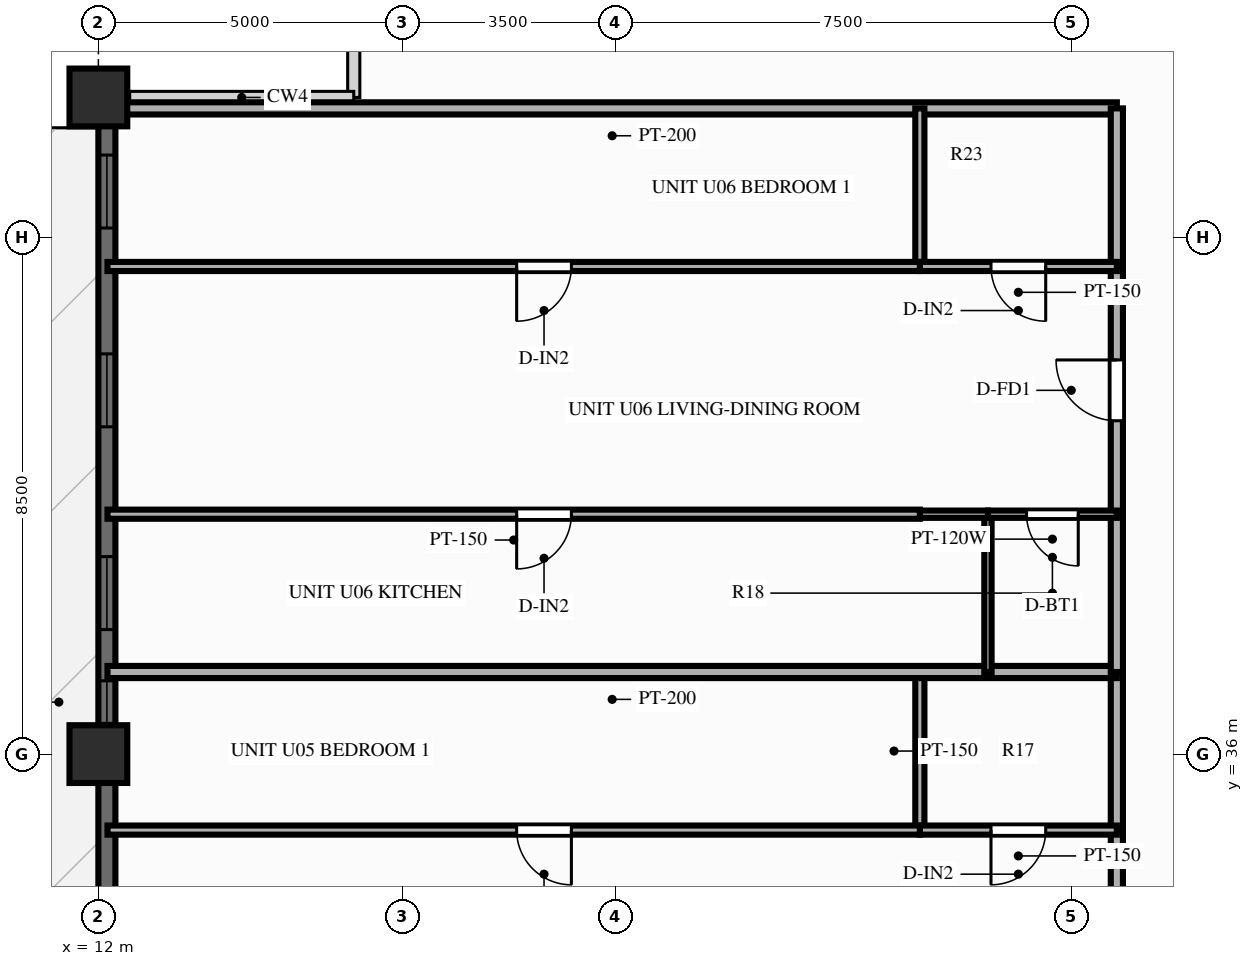
"""IFC4 building model, lengths in metres.
Left out: names, types, materials, properties, quantities, classifications, styles, units other than length and angle.
Written with IfcOpenShell. Run it as: python <this file> out.ifc"""

import sys

from ifc_helpers import new_model, si_unit, direction, frame, frame_2d, origin, origin_2d, place, context, subcontext, project, spatial, rectangle, extrude, source, transform, mapped, element, fill, save


model = new_model("IFC4")
c1 = context("Model", 3, precision=1e-05, world=origin(), true_north=direction((0.0, 1.0)))
c2 = subcontext(c1, "Body", "Model", "MODEL_VIEW")
j1 = project(units=[si_unit("LENGTHUNIT", "METRE"), si_unit("PLANEANGLEUNIT", "RADIAN")], contexts=[c1])
p1 = place(None, origin())
s1 = spatial("IfcSite", under=j1, at=p1, CompositionType="ELEMENT")
p2 = place(p1, origin())
s2 = spatial("IfcBuilding", under=s1, at=p2, CompositionType="ELEMENT")
p3 = place(p2, frame((0.0, 0.0, 126.75)))
s3 = spatial("IfcBuildingStorey", under=s2, at=p3, CompositionType="ELEMENT", Elevation=126.75)
m1 = source(origin(), c2, "Body", "SweptSolid", [
    extrude(rectangle(XDim=0.95, YDim=0.95, at=origin_2d()), origin(), (0.0, 0.0, 1.0), 3.0),
])
for number, where, z_axis, x_axis in (
    (1, (12.0, 46.8, 0.0), (0.0, 0.0, 1.0), (1.0, 0.0, 0.0)),
    (2, (12.0, 36.0, 0.0), (0.0, 0.0, 1.0), (1.0, 0.0, 0.0)),
):
    element("IfcColumn", number, at=place(p3, frame(where, z_axis=z_axis, x_axis=x_axis)), inside=s3, PredefinedType="COLUMN", context=c2, shape_type="MappedRepresentation", body=[
        mapped(m1, transform((0.0, 0.0, 0.0), scale=1.0)),
    ])
p4 = place(p3, frame((12.14, 7.2, 0.0), z_axis=(0.0, 0.0, 1.0), x_axis=(0.0, 1.0, 0.0)))
e3 = element("IfcWall", 3, at=p4, inside=s3, PredefinedType="SOLIDWALL", context=c2, shape_type="SweptSolid", body=[
    extrude(rectangle(XDim=39.6, YDim=0.28, at=frame_2d((19.8, 0.0))), origin(), (0.0, 0.0, 1.0), 2.28),
])
p5 = place(p4, frame((0.949, 0.0, 0.25)))
e4 = element("IfcOpeningElement", 4, at=p5, cuts=e3, PredefinedType="OPENING", context=c2, shape_type="SweptSolid", body=[
    extrude(rectangle(XDim=1.2, YDim=1.5, at=frame_2d((0.6, 0.75))), frame((0.0, 0.152, 0.0), z_axis=(0.0, -1.0, 0.0), x_axis=(1.0, 0.0, 0.0)), (0.0, 0.0, 1.0), 0.304),
])
p6 = place(p4, frame((3.292, 0.0, 0.25)))
e5 = element("IfcOpeningElement", 5, at=p6, cuts=e3, PredefinedType="OPENING", context=c2, shape_type="SweptSolid", body=[
    extrude(rectangle(XDim=1.2, YDim=1.5, at=frame_2d((0.6, 0.75))), frame((0.0, 0.152, 0.0), z_axis=(0.0, -1.0, 0.0), x_axis=(1.0, 0.0, 0.0)), (0.0, 0.0, 1.0), 0.304),
])
p7 = place(p4, frame((5.702, 0.0, 0.25)))
e6 = element("IfcOpeningElement", 6, at=p7, cuts=e3, PredefinedType="OPENING", context=c2, shape_type="SweptSolid", body=[
    extrude(rectangle(XDim=1.2, YDim=1.5, at=frame_2d((0.6, 0.75))), frame((0.0, 0.152, 0.0), z_axis=(0.0, -1.0, 0.0), x_axis=(1.0, 0.0, 0.0)), (0.0, 0.0, 1.0), 0.304),
])
p8 = place(p4, frame((8.112, 0.0, 0.25)))
e7 = element("IfcOpeningElement", 7, at=p8, cuts=e3, PredefinedType="OPENING", context=c2, shape_type="SweptSolid", body=[
    extrude(rectangle(XDim=1.2, YDim=1.5, at=frame_2d((0.6, 0.75))), frame((0.0, 0.152, 0.0), z_axis=(0.0, -1.0, 0.0), x_axis=(1.0, 0.0, 0.0)), (0.0, 0.0, 1.0), 0.304),
])
p9 = place(p4, frame((12.521, 0.0, 0.25)))
e8 = element("IfcOpeningElement", 8, at=p9, cuts=e3, PredefinedType="OPENING", context=c2, shape_type="SweptSolid", body=[
    extrude(rectangle(XDim=1.2, YDim=1.5, at=frame_2d((0.6, 0.75))), frame((0.0, 0.152, 0.0), z_axis=(0.0, -1.0, 0.0), x_axis=(1.0, 0.0, 0.0)), (0.0, 0.0, 1.0), 0.304),
])
p10 = place(p4, frame((14.745, 0.0, 0.25)))
e9 = element("IfcOpeningElement", 9, at=p10, cuts=e3, PredefinedType="OPENING", context=c2, shape_type="SweptSolid", body=[
    extrude(rectangle(XDim=1.2, YDim=1.5, at=frame_2d((0.6, 0.75))), frame((0.0, 0.152, 0.0), z_axis=(0.0, -1.0, 0.0), x_axis=(1.0, 0.0, 0.0)), (0.0, 0.0, 1.0), 0.304),
])
p11 = place(p4, frame((16.97, 0.0, 0.25)))
e10 = element("IfcOpeningElement", 10, at=p11, cuts=e3, PredefinedType="OPENING", context=c2, shape_type="SweptSolid", body=[
    extrude(rectangle(XDim=1.2, YDim=1.5, at=frame_2d((0.6, 0.75))), frame((0.0, 0.152, 0.0), z_axis=(0.0, -1.0, 0.0), x_axis=(1.0, 0.0, 0.0)), (0.0, 0.0, 1.0), 0.304),
])
p12 = place(p4, frame((19.2, 0.0, 0.25)))
e11 = element("IfcOpeningElement", 11, at=p12, cuts=e3, PredefinedType="OPENING", context=c2, shape_type="SweptSolid", body=[
    extrude(rectangle(XDim=1.2, YDim=1.5, at=frame_2d((0.6, 0.75))), frame((0.0, 0.152, 0.0), z_axis=(0.0, -1.0, 0.0), x_axis=(1.0, 0.0, 0.0)), (0.0, 0.0, 1.0), 0.304),
])
p13 = place(p4, frame((21.578, 0.0, 0.25)))
e12 = element("IfcOpeningElement", 12, at=p13, cuts=e3, PredefinedType="OPENING", context=c2, shape_type="SweptSolid", body=[
    extrude(rectangle(XDim=1.2, YDim=1.5, at=frame_2d((0.6, 0.75))), frame((0.0, 0.152, 0.0), z_axis=(0.0, -1.0, 0.0), x_axis=(1.0, 0.0, 0.0)), (0.0, 0.0, 1.0), 0.304),
])
p14 = place(p4, frame((24.713, 0.0, 0.0)))
e13 = element("IfcOpeningElement", 13, at=p14, cuts=e3, PredefinedType="OPENING", context=c2, shape_type="SweptSolid", body=[
    extrude(rectangle(XDim=1.6, YDim=2.15, at=frame_2d((0.8, 1.075))), frame((0.0, 0.152, 0.0), z_axis=(0.0, -1.0, 0.0), x_axis=(1.0, 0.0, 0.0)), (0.0, 0.0, 1.0), 0.304),
])
p15 = place(p4, frame((29.305, 0.0, 0.25)))
e14 = element("IfcOpeningElement", 14, at=p15, cuts=e3, PredefinedType="OPENING", context=c2, shape_type="SweptSolid", body=[
    extrude(rectangle(XDim=0.7, YDim=1.5, at=frame_2d((0.35, 0.75))), frame((0.0, 0.152, 0.0), z_axis=(0.0, -1.0, 0.0), x_axis=(1.0, 0.0, 0.0)), (0.0, 0.0, 1.0), 0.304),
])
p16 = place(p4, frame((30.848, 0.0, 0.25)))
e15 = element("IfcOpeningElement", 15, at=p16, cuts=e3, PredefinedType="OPENING", context=c2, shape_type="SweptSolid", body=[
    extrude(rectangle(XDim=1.2, YDim=1.5, at=frame_2d((0.6, 0.75))), frame((0.0, 0.152, 0.0), z_axis=(0.0, -1.0, 0.0), x_axis=(1.0, 0.0, 0.0)), (0.0, 0.0, 1.0), 0.304),
])
p17 = place(p4, frame((34.183, 0.0, 0.25)))
e16 = element("IfcOpeningElement", 16, at=p17, cuts=e3, PredefinedType="OPENING", context=c2, shape_type="SweptSolid", body=[
    extrude(rectangle(XDim=1.2, YDim=1.5, at=frame_2d((0.6, 0.75))), frame((0.0, 0.152, 0.0), z_axis=(0.0, -1.0, 0.0), x_axis=(1.0, 0.0, 0.0)), (0.0, 0.0, 1.0), 0.304),
])
p18 = place(p4, frame((37.452, 0.0, 0.25)))
e17 = element("IfcOpeningElement", 17, at=p18, cuts=e3, PredefinedType="OPENING", context=c2, shape_type="SweptSolid", body=[
    extrude(rectangle(XDim=1.2, YDim=1.5, at=frame_2d((0.6, 0.75))), frame((0.0, 0.152, 0.0), z_axis=(0.0, -1.0, 0.0), x_axis=(1.0, 0.0, 0.0)), (0.0, 0.0, 1.0), 0.304),
])
p19 = place(p3, frame((28.75, 46.62, 0.0), z_axis=(0.0, 0.0, 1.0), x_axis=(-1.0, 0.0, 0.0)))
e18 = element("IfcWall", 18, at=p19, inside=s3, PredefinedType="PARTITIONING", context=c2, shape_type="SweptSolid", body=[
    extrude(rectangle(XDim=16.6, YDim=0.2, at=frame_2d((8.3, 0.0))), origin(), (0.0, 0.0, 1.0), 2.79),
])
p20 = place(p3, frame((28.75, 30.676, 0.0), z_axis=(0.0, 0.0, 1.0), x_axis=(0.0, 1.0, 0.0)))
e19 = element("IfcWall", 19, at=p20, inside=s3, PredefinedType="PARTITIONING", context=c2, shape_type="SweptSolid", body=[
    extrude(rectangle(XDim=4.074, YDim=0.2, at=frame_2d((2.037, 0.0))), origin(), (0.0, 0.0, 1.0), 2.79),
])
p21 = place(p20, frame((1.537, 0.0, 0.0)))
e20 = element("IfcOpeningElement", 20, at=p21, cuts=e19, PredefinedType="OPENING", context=c2, shape_type="SweptSolid", body=[
    extrude(rectangle(XDim=1.0, YDim=2.15, at=frame_2d((0.5, 1.075))), frame((0.0, 0.112, 0.0), z_axis=(0.0, -1.0, 0.0), x_axis=(1.0, 0.0, 0.0)), (0.0, 0.0, 1.0), 0.224),
])
p22 = place(p3, frame((28.75, 34.75, 0.0), z_axis=(0.0, 0.0, 1.0), x_axis=(0.0, 1.0, 0.0)))
e21 = element("IfcWall", 21, at=p22, inside=s3, PredefinedType="PARTITIONING", context=c2, shape_type="SweptSolid", body=[
    extrude(rectangle(XDim=2.6, YDim=0.2, at=frame_2d((1.3, 0.0))), origin(), (0.0, 0.0, 1.0), 2.79),
])
p23 = place(p3, frame((25.51, 34.75, 0.0), z_axis=(0.0, 0.0, 1.0), x_axis=(0.0, 1.0, 0.0)))
e22 = element("IfcWall", 22, at=p23, inside=s3, PredefinedType="PARTITIONING", context=c2, shape_type="SweptSolid", body=[
    extrude(rectangle(XDim=2.6, YDim=0.15, at=frame_2d((1.3, 0.0))), origin(), (0.0, 0.0, 1.0), 2.79),
])
p24 = place(p3, frame((28.75, 34.75, 0.0), z_axis=(0.0, 0.0, 1.0), x_axis=(-1.0, 0.0, 0.0)))
e23 = element("IfcWall", 23, at=p24, inside=s3, PredefinedType="PARTITIONING", context=c2, shape_type="SweptSolid", body=[
    extrude(rectangle(XDim=3.24, YDim=0.15, at=frame_2d((1.62, 0.0))), origin(), (0.0, 0.0, 1.0), 2.79),
])
p25 = place(p24, frame((1.17, 0.0, 0.0)))
e24 = element("IfcOpeningElement", 24, at=p25, cuts=e23, PredefinedType="OPENING", context=c2, shape_type="SweptSolid", body=[
    extrude(rectangle(XDim=0.9, YDim=2.1, at=frame_2d((0.45, 1.05))), frame((0.0, 0.087, 0.0), z_axis=(0.0, -1.0, 0.0), x_axis=(1.0, 0.0, 0.0)), (0.0, 0.0, 1.0), 0.174),
])
p26 = place(p3, frame((25.51, 34.75, 0.0), z_axis=(0.0, 0.0, 1.0), x_axis=(-1.0, 0.0, 0.0)))
e25 = element("IfcWall", 25, at=p26, inside=s3, PredefinedType="PARTITIONING", context=c2, shape_type="SweptSolid", body=[
    extrude(rectangle(XDim=13.36, YDim=0.15, at=frame_2d((6.68, 0.0))), origin(), (0.0, 0.0, 1.0), 2.79),
])
p27 = place(p26, frame((5.731, 0.0, 0.0)))
e26 = element("IfcOpeningElement", 26, at=p27, cuts=e25, PredefinedType="OPENING", context=c2, shape_type="SweptSolid", body=[
    extrude(rectangle(XDim=0.9, YDim=2.1, at=frame_2d((0.45, 1.05))), frame((0.0, 0.087, 0.0), z_axis=(0.0, -1.0, 0.0), x_axis=(1.0, 0.0, 0.0)), (0.0, 0.0, 1.0), 0.174),
])
p28 = place(p3, frame((28.75, 37.35, 0.0), z_axis=(0.0, 0.0, 1.0), x_axis=(-1.0, 0.0, 0.0)))
e27 = element("IfcWall", 27, at=p28, inside=s3, PredefinedType="PARTITIONING", context=c2, shape_type="SweptSolid", body=[
    extrude(rectangle(XDim=16.6, YDim=0.2, at=frame_2d((8.3, 0.0))), origin(), (0.0, 0.0, 1.0), 2.79),
])
p29 = place(p3, frame((28.75, 37.35, 0.0), z_axis=(0.0, 0.0, 1.0), x_axis=(0.0, 1.0, 0.0)))
e28 = element("IfcWall", 28, at=p29, inside=s3, PredefinedType="PARTITIONING", context=c2, shape_type="SweptSolid", body=[
    extrude(rectangle(XDim=2.595, YDim=0.2, at=frame_2d((1.298, 0.0))), origin(), (0.0, 0.0, 1.0), 2.79),
])
p30 = place(p3, frame((28.75, 39.946, 0.0), z_axis=(0.0, 0.0, 1.0), x_axis=(0.0, 1.0, 0.0)))
e29 = element("IfcWall", 29, at=p30, inside=s3, PredefinedType="PARTITIONING", context=c2, shape_type="SweptSolid", body=[
    extrude(rectangle(XDim=4.074, YDim=0.2, at=frame_2d((2.037, 0.0))), origin(), (0.0, 0.0, 1.0), 2.79),
])
p31 = place(p30, frame((1.537, 0.0, 0.0)))
e30 = element("IfcOpeningElement", 30, at=p31, cuts=e29, PredefinedType="OPENING", context=c2, shape_type="SweptSolid", body=[
    extrude(rectangle(XDim=1.0, YDim=2.15, at=frame_2d((0.5, 1.075))), frame((0.0, 0.112, 0.0), z_axis=(0.0, -1.0, 0.0), x_axis=(1.0, 0.0, 0.0)), (0.0, 0.0, 1.0), 0.224),
])
p32 = place(p3, frame((28.75, 44.02, 0.0), z_axis=(0.0, 0.0, 1.0), x_axis=(0.0, 1.0, 0.0)))
e31 = element("IfcWall", 31, at=p32, inside=s3, PredefinedType="PARTITIONING", context=c2, shape_type="SweptSolid", body=[
    extrude(rectangle(XDim=2.6, YDim=0.2, at=frame_2d((1.3, 0.0))), origin(), (0.0, 0.0, 1.0), 2.79),
])
p33 = place(p3, frame((26.63, 37.35, 0.0), z_axis=(0.0, 0.0, 1.0), x_axis=(0.0, 1.0, 0.0)))
e32 = element("IfcWall", 32, at=p33, inside=s3, PredefinedType="PARTITIONING", context=c2, shape_type="SweptSolid", body=[
    extrude(rectangle(XDim=2.595, YDim=0.12, at=frame_2d((1.298, 0.0))), origin(), (0.0, 0.0, 1.0), 2.79),
])
p34 = place(p3, frame((25.51, 44.02, 0.0), z_axis=(0.0, 0.0, 1.0), x_axis=(0.0, 1.0, 0.0)))
e33 = element("IfcWall", 33, at=p34, inside=s3, PredefinedType="PARTITIONING", context=c2, shape_type="SweptSolid", body=[
    extrude(rectangle(XDim=2.6, YDim=0.15, at=frame_2d((1.3, 0.0))), origin(), (0.0, 0.0, 1.0), 2.79),
])
p35 = place(p3, frame((28.75, 39.946, 0.0), z_axis=(0.0, 0.0, 1.0), x_axis=(-1.0, 0.0, 0.0)))
e34 = element("IfcWall", 34, at=p35, inside=s3, PredefinedType="PARTITIONING", context=c2, shape_type="SweptSolid", body=[
    extrude(rectangle(XDim=2.12, YDim=0.12, at=frame_2d((1.06, 0.0))), origin(), (0.0, 0.0, 1.0), 2.79),
])
p36 = place(p35, frame((0.635, 0.0, 0.0)))
e35 = element("IfcOpeningElement", 35, at=p36, cuts=e34, PredefinedType="OPENING", context=c2, shape_type="SweptSolid", body=[
    extrude(rectangle(XDim=0.85, YDim=2.05, at=frame_2d((0.425, 1.025))), frame((0.0, 0.072, 0.0), z_axis=(0.0, -1.0, 0.0), x_axis=(1.0, 0.0, 0.0)), (0.0, 0.0, 1.0), 0.144),
])
p37 = place(p3, frame((26.63, 39.946, 0.0), z_axis=(0.0, 0.0, 1.0), x_axis=(-1.0, 0.0, 0.0)))
e36 = element("IfcWall", 36, at=p37, inside=s3, PredefinedType="PARTITIONING", context=c2, shape_type="SweptSolid", body=[
    extrude(rectangle(XDim=1.12, YDim=0.12, at=frame_2d((0.56, 0.0))), origin(), (0.0, 0.0, 1.0), 2.79),
])
p38 = place(p3, frame((25.51, 39.946, 0.0), z_axis=(0.0, 0.0, 1.0), x_axis=(-1.0, 0.0, 0.0)))
e37 = element("IfcWall", 37, at=p38, inside=s3, PredefinedType="PARTITIONING", context=c2, shape_type="SweptSolid", body=[
    extrude(rectangle(XDim=13.36, YDim=0.15, at=frame_2d((6.68, 0.0))), origin(), (0.0, 0.0, 1.0), 2.79),
])
p39 = place(p38, frame((5.731, 0.0, 0.0)))
e38 = element("IfcOpeningElement", 38, at=p39, cuts=e37, PredefinedType="OPENING", context=c2, shape_type="SweptSolid", body=[
    extrude(rectangle(XDim=0.9, YDim=2.1, at=frame_2d((0.45, 1.05))), frame((0.0, 0.087, 0.0), z_axis=(0.0, -1.0, 0.0), x_axis=(1.0, 0.0, 0.0)), (0.0, 0.0, 1.0), 0.174),
])
p40 = place(p3, frame((28.75, 44.02, 0.0), z_axis=(0.0, 0.0, 1.0), x_axis=(-1.0, 0.0, 0.0)))
e39 = element("IfcWall", 39, at=p40, inside=s3, PredefinedType="PARTITIONING", context=c2, shape_type="SweptSolid", body=[
    extrude(rectangle(XDim=3.24, YDim=0.15, at=frame_2d((1.62, 0.0))), origin(), (0.0, 0.0, 1.0), 2.79),
])
p41 = place(p40, frame((1.17, 0.0, 0.0)))
e40 = element("IfcOpeningElement", 40, at=p41, cuts=e39, PredefinedType="OPENING", context=c2, shape_type="SweptSolid", body=[
    extrude(rectangle(XDim=0.9, YDim=2.1, at=frame_2d((0.45, 1.05))), frame((0.0, 0.087, 0.0), z_axis=(0.0, -1.0, 0.0), x_axis=(1.0, 0.0, 0.0)), (0.0, 0.0, 1.0), 0.174),
])
p42 = place(p3, frame((25.51, 44.02, 0.0), z_axis=(0.0, 0.0, 1.0), x_axis=(-1.0, 0.0, 0.0)))
e41 = element("IfcWall", 41, at=p42, inside=s3, PredefinedType="PARTITIONING", context=c2, shape_type="SweptSolid", body=[
    extrude(rectangle(XDim=13.36, YDim=0.15, at=frame_2d((6.68, 0.0))), origin(), (0.0, 0.0, 1.0), 2.79),
])
p43 = place(p42, frame((5.731, 0.0, 0.0)))
e42 = element("IfcOpeningElement", 42, at=p43, cuts=e41, PredefinedType="OPENING", context=c2, shape_type="SweptSolid", body=[
    extrude(rectangle(XDim=0.9, YDim=2.1, at=frame_2d((0.45, 1.05))), frame((0.0, 0.087, 0.0), z_axis=(0.0, -1.0, 0.0), x_axis=(1.0, 0.0, 0.0)), (0.0, 0.0, 1.0), 0.174),
])
m2 = source(origin(), c2, "Body", "SweptSolid", [
    extrude(rectangle(XDim=0.7, YDim=1.5, at=frame_2d((0.35, 0.75))), frame((0.0, 0.03, 0.0), z_axis=(0.0, -1.0, 0.0), x_axis=(1.0, 0.0, 0.0)), (0.0, 0.0, 1.0), 0.06),
])
p44 = place(p15, origin())
e43 = element("IfcWindow", 43, at=p44, inside=s3, PartitioningType="SINGLE_PANEL", PredefinedType="WINDOW", context=c2, shape_type="MappedRepresentation", body=[
    mapped(m2, transform((0.0, 0.0, 0.0), scale=1.0)),
])
fill(e14, e43)
m3 = source(origin(), c2, "Body", "SweptSolid", [
    extrude(rectangle(XDim=1.2, YDim=1.5, at=frame_2d((0.6, 0.75))), frame((0.0, 0.03, 0.0), z_axis=(0.0, -1.0, 0.0), x_axis=(1.0, 0.0, 0.0)), (0.0, 0.0, 1.0), 0.06),
])
p45 = place(p16, origin())
e44 = element("IfcWindow", 44, at=p45, inside=s3, PartitioningType="SINGLE_PANEL", PredefinedType="WINDOW", context=c2, shape_type="MappedRepresentation", body=[
    mapped(m3, transform((0.0, 0.0, 0.0), scale=1.0)),
])
fill(e15, e44)
p46 = place(p17, origin())
e45 = element("IfcWindow", 45, at=p46, inside=s3, PartitioningType="SINGLE_PANEL", PredefinedType="WINDOW", context=c2, shape_type="MappedRepresentation", body=[
    mapped(m3, transform((0.0, 0.0, 0.0), scale=1.0)),
])
fill(e16, e45)
p47 = place(p18, origin())
e46 = element("IfcWindow", 46, at=p47, inside=s3, PartitioningType="SINGLE_PANEL", PredefinedType="WINDOW", context=c2, shape_type="MappedRepresentation", body=[
    mapped(m3, transform((0.0, 0.0, 0.0), scale=1.0)),
])
fill(e17, e46)
m4 = source(origin(), c2, "Body", "SweptSolid", [
    extrude(rectangle(XDim=0.9, YDim=2.1, at=frame_2d((0.45, 1.05))), frame((0.0, 0.025, 0.0), z_axis=(0.0, -1.0, 0.0), x_axis=(1.0, 0.0, 0.0)), (0.0, 0.0, 1.0), 0.05),
])
p48 = place(p25, origin())
e47 = element("IfcDoor", 47, at=p48, inside=s3, OperationType="SINGLE_SWING_RIGHT", PredefinedType="DOOR", context=c2, shape_type="MappedRepresentation", body=[
    mapped(m4, transform((0.0, 0.0, 0.0), scale=1.0)),
])
fill(e24, e47)
p49 = place(p27, origin())
e48 = element("IfcDoor", 48, at=p49, inside=s3, OperationType="SINGLE_SWING_LEFT", PredefinedType="DOOR", context=c2, shape_type="MappedRepresentation", body=[
    mapped(m4, transform((0.0, 0.0, 0.0), scale=1.0)),
])
fill(e26, e48)
m5 = source(origin(), c2, "Body", "SweptSolid", [
    extrude(rectangle(XDim=1.0, YDim=2.15, at=frame_2d((0.5, 1.075))), frame((0.0, 0.025, 0.0), z_axis=(0.0, -1.0, 0.0), x_axis=(1.0, 0.0, 0.0)), (0.0, 0.0, 1.0), 0.05),
])
p50 = place(p31, origin())
e49 = element("IfcDoor", 49, at=p50, inside=s3, OperationType="SINGLE_SWING_RIGHT", PredefinedType="DOOR", context=c2, shape_type="MappedRepresentation", body=[
    mapped(m5, transform((0.0, 0.0, 0.0), scale=1.0)),
])
fill(e30, e49)
m6 = source(origin(), c2, "Body", "SweptSolid", [
    extrude(rectangle(XDim=0.85, YDim=2.05, at=frame_2d((0.425, 1.025))), frame((0.0, 0.025, 0.0), z_axis=(0.0, -1.0, 0.0), x_axis=(1.0, 0.0, 0.0)), (0.0, 0.0, 1.0), 0.05),
])
p51 = place(p36, origin())
e50 = element("IfcDoor", 50, at=p51, inside=s3, OperationType="SINGLE_SWING_LEFT", PredefinedType="DOOR", context=c2, shape_type="MappedRepresentation", body=[
    mapped(m6, transform((0.0, 0.0, 0.0), scale=1.0)),
])
fill(e35, e50)
p52 = place(p39, origin())
e51 = element("IfcDoor", 51, at=p52, inside=s3, OperationType="SINGLE_SWING_RIGHT", PredefinedType="DOOR", context=c2, shape_type="MappedRepresentation", body=[
    mapped(m4, transform((0.0, 0.0, 0.0), scale=1.0)),
])
fill(e38, e51)
p53 = place(p41, origin())
e52 = element("IfcDoor", 52, at=p53, inside=s3, OperationType="SINGLE_SWING_LEFT", PredefinedType="DOOR", context=c2, shape_type="MappedRepresentation", body=[
    mapped(m4, transform((0.0, 0.0, 0.0), scale=1.0)),
])
fill(e40, e52)
p54 = place(p43, origin())
e53 = element("IfcDoor", 53, at=p54, inside=s3, OperationType="SINGLE_SWING_RIGHT", PredefinedType="DOOR", context=c2, shape_type="MappedRepresentation", body=[
    mapped(m4, transform((0.0, 0.0, 0.0), scale=1.0)),
])
fill(e42, e53)
save(model, sys.argv[1])
